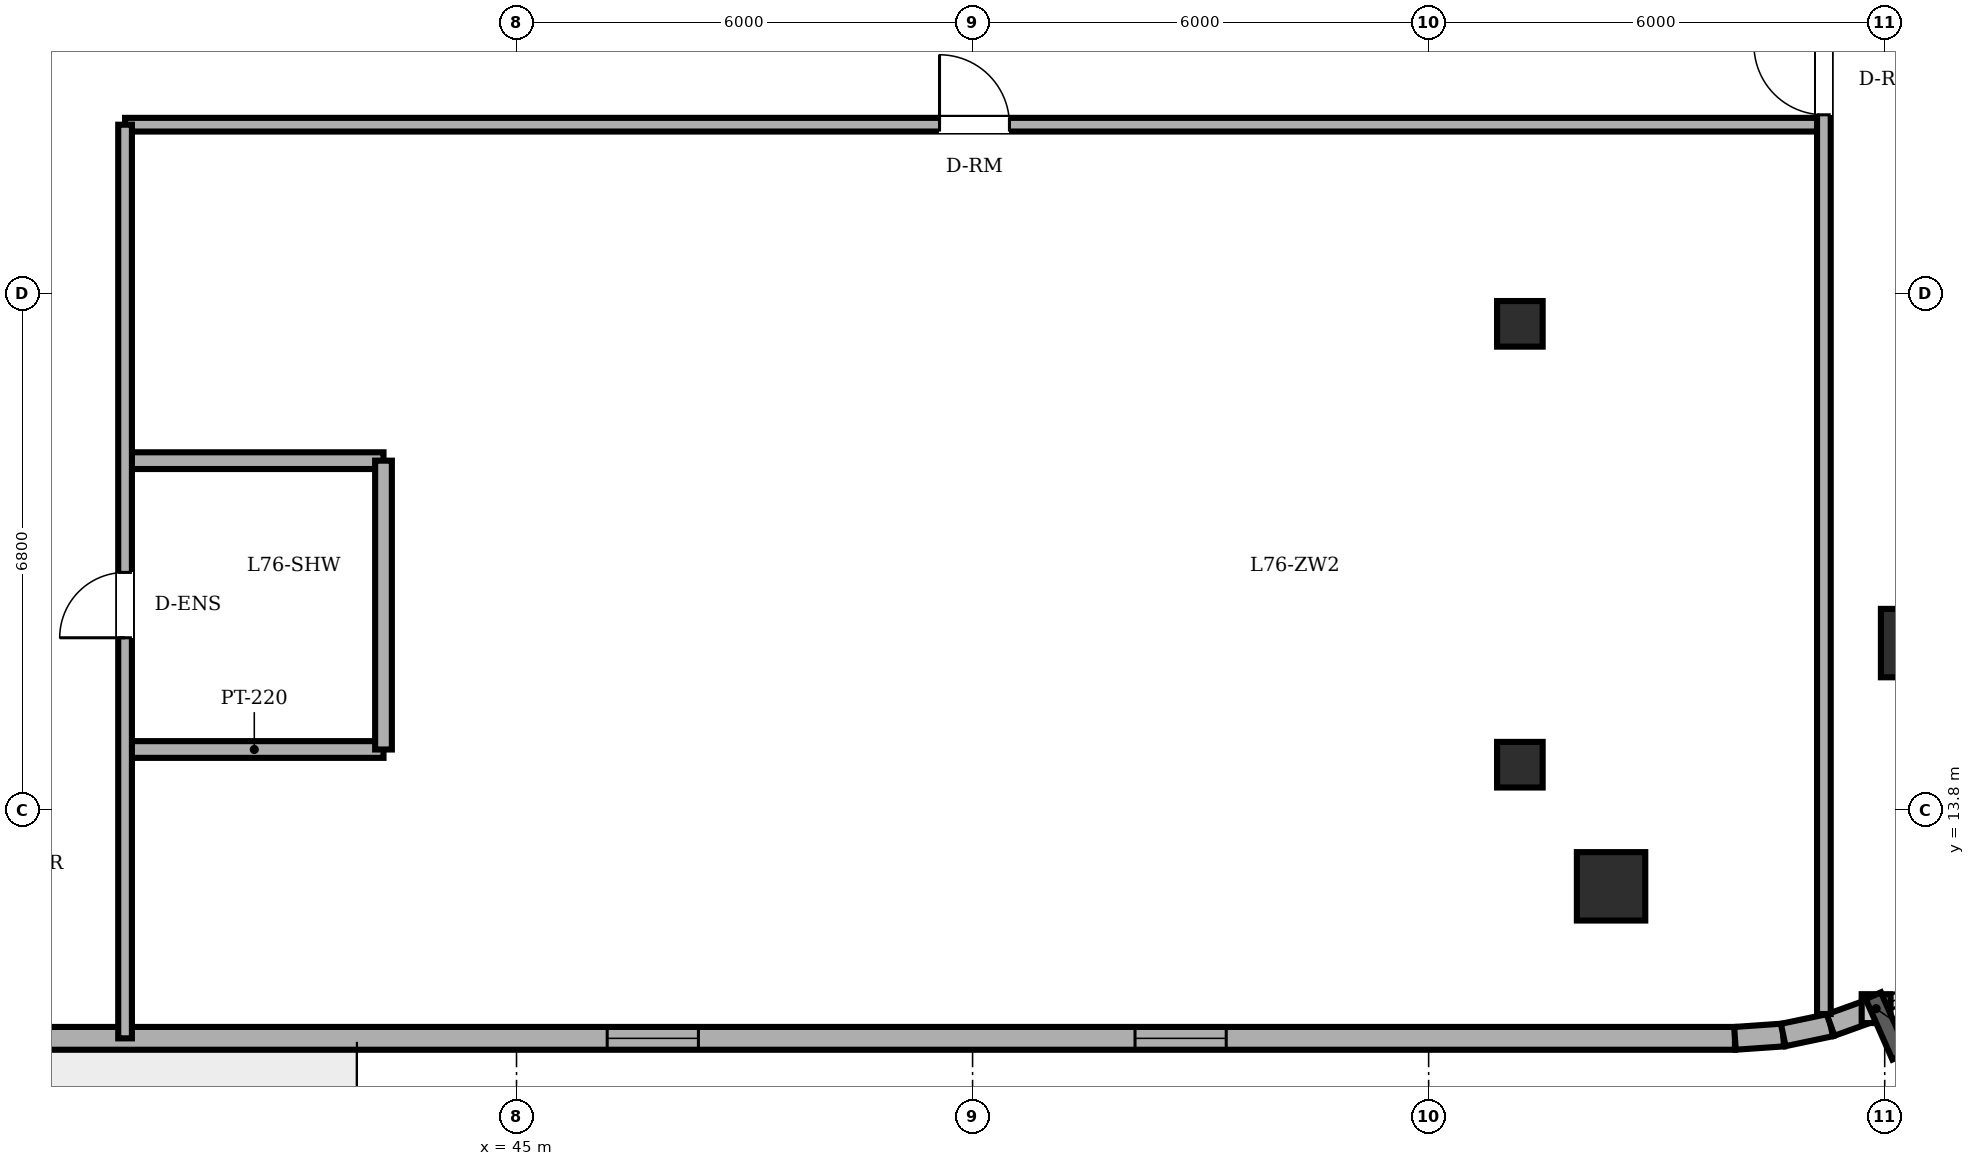
"""IFC4 building model, lengths in metres.
Left out: names, types, materials, properties, quantities, classifications, styles, units other than length and angle.
Written with IfcOpenShell. Run it as: python <this file> out.ifc"""

import sys

from ifc_helpers import new_model, si_unit, direction, frame, frame_2d, origin, origin_2d, place, context, subcontext, project, spatial, rectangle, circle, extrude, element, fill, save


model = new_model("IFC4")
c1 = context("Model", 3, precision=1e-05, world=origin(), true_north=direction((0.0, 1.0)))
c2 = subcontext(c1, "Body", "Model", "MODEL_VIEW")
j1 = project(units=[si_unit("LENGTHUNIT", "METRE"), si_unit("PLANEANGLEUNIT", "RADIAN")], contexts=[c1])
p1 = place(None, origin())
s1 = spatial("IfcSite", under=j1, at=p1, CompositionType="ELEMENT")
p2 = place(p1, origin())
s2 = spatial("IfcBuilding", under=s1, at=p2, CompositionType="ELEMENT")
p3 = place(p2, frame((0.0, 0.0, 291.65)))
s3 = spatial("IfcBuildingStorey", under=s2, at=p3, CompositionType="ELEMENT", Elevation=291.65)
for number, where, z_axis, x_axis in (
    (1, (59.4, 12.8, 0.0), (0.0, 0.0, 1.0), (1.0, 0.0, 0.0)),
    (2, (63.4, 16.0, 0.0), (0.0, 0.0, 1.0), (1.0, 0.0, 0.0)),
):
    element("IfcColumn", number, at=place(p3, frame(where, z_axis=z_axis, x_axis=x_axis)), inside=s3, PredefinedType="COLUMN", context=c2, shape_type="SweptSolid", body=[
        extrude(circle(Radius=0.45, at=origin_2d()), origin(), (0.0, 0.0, 1.0), 3.65),
    ])
for number, where, z_axis, x_axis in (
    (3, (58.2, 14.4, 0.0), (0.0, 0.0, 1.0), (1.0, 0.0, 0.0)),
    (4, (58.2, 20.2, 0.0), (0.0, 0.0, 1.0), (1.0, 0.0, 0.0)),
):
    element("IfcColumn", number, at=place(p3, frame(where, z_axis=z_axis, x_axis=x_axis)), inside=s3, PredefinedType="COLUMN", context=c2, shape_type="SweptSolid", body=[
        extrude(rectangle(XDim=0.6, YDim=0.6, at=origin_2d()), origin(), (0.0, 0.0, 1.0), 3.65),
    ])
p4 = place(p3, frame((24.0, 10.8, 0.0), z_axis=(0.0, 0.0, 1.0), x_axis=(1.0, 0.0, 0.0)))
e5 = element("IfcWall", 5, at=p4, inside=s3, PredefinedType="SOLIDWALL", context=c2, shape_type="SweptSolid", body=[
    extrude(rectangle(XDim=37.03, YDim=0.3, at=frame_2d((18.515, 0.0))), origin(), (0.0, 0.0, 1.0), 3.41),
])
p5 = place(p4, frame((7.925, 0.0, 0.0)))
e6 = element("IfcOpeningElement", 6, at=p5, cuts=e5, PredefinedType="OPENING", context=c2, shape_type="SweptSolid", body=[
    extrude(rectangle(XDim=0.95, YDim=2.2, at=frame_2d((0.475, 1.1))), frame((0.0, 0.16, 0.0), z_axis=(0.0, -1.0, 0.0), x_axis=(1.0, 0.0, 0.0)), (0.0, 0.0, 1.0), 0.32),
])
p6 = place(p4, frame((4.917, 0.0, 0.85)))
e7 = element("IfcOpeningElement", 7, at=p6, cuts=e5, PredefinedType="OPENING", context=c2, shape_type="SweptSolid", body=[
    extrude(rectangle(XDim=1.2, YDim=1.6, at=frame_2d((0.6, 0.8))), frame((0.0, 0.16, 0.0), z_axis=(0.0, -1.0, 0.0), x_axis=(1.0, 0.0, 0.0)), (0.0, 0.0, 1.0), 0.32),
])
p7 = place(p4, frame((10.083, 0.0, 0.85)))
e8 = element("IfcOpeningElement", 8, at=p7, cuts=e5, PredefinedType="OPENING", context=c2, shape_type="SweptSolid", body=[
    extrude(rectangle(XDim=1.2, YDim=1.6, at=frame_2d((0.6, 0.8))), frame((0.0, 0.16, 0.0), z_axis=(0.0, -1.0, 0.0), x_axis=(1.0, 0.0, 0.0)), (0.0, 0.0, 1.0), 0.32),
])
p8 = place(p4, frame((22.193, 0.0, 0.85)))
e9 = element("IfcOpeningElement", 9, at=p8, cuts=e5, PredefinedType="OPENING", context=c2, shape_type="SweptSolid", body=[
    extrude(rectangle(XDim=1.2, YDim=1.6, at=frame_2d((0.6, 0.8))), frame((0.0, 0.16, 0.0), z_axis=(0.0, -1.0, 0.0), x_axis=(1.0, 0.0, 0.0)), (0.0, 0.0, 1.0), 0.32),
])
p9 = place(p4, frame((29.137, 0.0, 0.85)))
e10 = element("IfcOpeningElement", 10, at=p9, cuts=e5, PredefinedType="OPENING", context=c2, shape_type="SweptSolid", body=[
    extrude(rectangle(XDim=1.2, YDim=1.6, at=frame_2d((0.6, 0.8))), frame((0.0, 0.16, 0.0), z_axis=(0.0, -1.0, 0.0), x_axis=(1.0, 0.0, 0.0)), (0.0, 0.0, 1.0), 0.32),
])
p10 = place(p3, frame((61.03, 10.8, 0.0), z_axis=(0.0, 0.0, 1.0), x_axis=(0.997613959688, 0.069039028352, 0.0)))
e11 = element("IfcWall", 11, at=p10, inside=s3, PredefinedType="SOLIDWALL", context=c2, shape_type="SweptSolid", body=[
    extrude(rectangle(XDim=0.636, YDim=0.3, at=frame_2d((0.318, 0.0))), origin(), (0.0, 0.0, 1.0), 3.41),
])
p11 = place(p3, frame((61.665, 10.844, 0.0), z_axis=(0.0, 0.0, 1.0), x_axis=(0.97857012251, 0.205913854149, 0.0)))
e12 = element("IfcWall", 12, at=p11, inside=s3, PredefinedType="SOLIDWALL", context=c2, shape_type="SweptSolid", body=[
    extrude(rectangle(XDim=0.637, YDim=0.3, at=frame_2d((0.318, 0.0))), origin(), (0.0, 0.0, 1.0), 3.41),
])
p12 = place(p3, frame((62.288, 10.975, 0.0), z_axis=(0.0, 0.0, 1.0), x_axis=(0.94077491148, 0.339031806665, 0.0)))
e13 = element("IfcWall", 13, at=p12, inside=s3, PredefinedType="SOLIDWALL", context=c2, shape_type="SweptSolid", body=[
    extrude(rectangle(XDim=0.636, YDim=0.3, at=frame_2d((0.318, 0.0))), origin(), (0.0, 0.0, 1.0), 3.41),
])
p13 = place(p3, frame((39.85, 14.6, 0.0), z_axis=(0.0, 0.0, 1.0), x_axis=(1.0, 0.0, 0.0)))
e14 = element("IfcWall", 14, at=p13, inside=s3, PredefinedType="PARTITIONING", context=c2, shape_type="SweptSolid", body=[
    extrude(rectangle(XDim=3.4, YDim=0.22, at=frame_2d((1.7, 0.0))), origin(), (0.0, 0.0, 1.0), 3.052),
])
p14 = place(p3, frame((39.85, 18.4, 0.0), z_axis=(0.0, 0.0, 1.0), x_axis=(1.0, 0.0, 0.0)))
e15 = element("IfcWall", 15, at=p14, inside=s3, PredefinedType="PARTITIONING", context=c2, shape_type="SweptSolid", body=[
    extrude(rectangle(XDim=3.4, YDim=0.22, at=frame_2d((1.7, 0.0))), origin(), (0.0, 0.0, 1.0), 3.41),
])
p15 = place(p3, frame((39.85, 22.82, 0.0), z_axis=(0.0, 0.0, 1.0), x_axis=(1.0, 0.0, 0.0)))
e16 = element("IfcWall", 16, at=p15, inside=s3, PredefinedType="PARTITIONING", context=c2, shape_type="SweptSolid", body=[
    extrude(rectangle(XDim=22.35, YDim=0.18, at=frame_2d((11.175, 0.0))), origin(), (0.0, 0.0, 1.0), 3.41),
])
p16 = place(p15, frame((10.715, 0.0, 0.0)))
e17 = element("IfcOpeningElement", 17, at=p16, cuts=e16, PredefinedType="OPENING", context=c2, shape_type="SweptSolid", body=[
    extrude(rectangle(XDim=0.92, YDim=2.1, at=frame_2d((0.46, 1.05))), frame((0.0, 0.1, 0.0), z_axis=(0.0, -1.0, 0.0), x_axis=(1.0, 0.0, 0.0)), (0.0, 0.0, 1.0), 0.2),
])
p17 = place(p3, frame((39.85, 10.8, 0.0), z_axis=(0.0, 0.0, 1.0), x_axis=(0.0, 1.0, 0.0)))
e18 = element("IfcWall", 18, at=p17, inside=s3, PredefinedType="PARTITIONING", context=c2, shape_type="SweptSolid", body=[
    extrude(rectangle(XDim=12.02, YDim=0.18, at=frame_2d((6.01, 0.0))), origin(), (0.0, 0.0, 1.0), 3.41),
])
p18 = place(p17, frame((5.27, 0.0, 0.0)))
e19 = element("IfcOpeningElement", 19, at=p18, cuts=e18, PredefinedType="OPENING", context=c2, shape_type="SweptSolid", body=[
    extrude(rectangle(XDim=0.86, YDim=2.1, at=frame_2d((0.43, 1.05))), frame((0.0, 0.1, 0.0), z_axis=(0.0, -1.0, 0.0), x_axis=(1.0, 0.0, 0.0)), (0.0, 0.0, 1.0), 0.2),
])
p19 = place(p3, frame((43.25, 14.6, 0.0), z_axis=(0.0, 0.0, 1.0), x_axis=(0.0, 1.0, 0.0)))
e20 = element("IfcWall", 20, at=p19, inside=s3, PredefinedType="PARTITIONING", context=c2, shape_type="SweptSolid", body=[
    extrude(rectangle(XDim=3.8, YDim=0.22, at=frame_2d((1.9, 0.0))), origin(), (0.0, 0.0, 1.0), 3.41),
])
p20 = place(p3, frame((62.2, 11.12, 0.0), z_axis=(0.0, 0.0, 1.0), x_axis=(0.0, 1.0, 0.0)))
e21 = element("IfcWall", 21, at=p20, inside=s3, PredefinedType="PARTITIONING", context=c2, shape_type="SweptSolid", body=[
    extrude(rectangle(XDim=19.23, YDim=0.18, at=frame_2d((9.615, 0.0))), origin(), (0.0, 0.0, 1.0), 3.41),
])
p21 = place(p20, frame((15.295, 0.0, 0.0)))
e22 = element("IfcOpeningElement", 22, at=p21, cuts=e21, PredefinedType="OPENING", context=c2, shape_type="SweptSolid", body=[
    extrude(rectangle(XDim=1.0, YDim=2.15, at=frame_2d((0.5, 1.075))), frame((0.0, 0.1, 0.0), z_axis=(0.0, -1.0, 0.0), x_axis=(1.0, 0.0, 0.0)), (0.0, 0.0, 1.0), 0.2),
])
p22 = place(p20, frame((11.83, 0.0, 0.0)))
e23 = element("IfcOpeningElement", 23, at=p22, cuts=e21, PredefinedType="OPENING", context=c2, shape_type="SweptSolid", body=[
    extrude(rectangle(XDim=0.92, YDim=2.1, at=frame_2d((0.46, 1.05))), frame((0.0, 0.1, 0.0), z_axis=(0.0, -1.0, 0.0), x_axis=(1.0, 0.0, 0.0)), (0.0, 0.0, 1.0), 0.2),
])
p23 = place(p8, origin())
e24 = element("IfcWindow", 24, at=p23, inside=s3, PartitioningType="SINGLE_PANEL", PredefinedType="WINDOW", context=c2, shape_type="SweptSolid", body=[
    extrude(rectangle(XDim=1.2, YDim=1.6, at=frame_2d((0.6, 0.8))), frame((0.0, 0.03, 0.0), z_axis=(0.0, -1.0, 0.0), x_axis=(1.0, 0.0, 0.0)), (0.0, 0.0, 1.0), 0.06),
])
fill(e9, e24)
p24 = place(p9, origin())
e25 = element("IfcWindow", 25, at=p24, inside=s3, PartitioningType="SINGLE_PANEL", PredefinedType="WINDOW", context=c2, shape_type="SweptSolid", body=[
    extrude(rectangle(XDim=1.2, YDim=1.6, at=frame_2d((0.6, 0.8))), frame((0.0, 0.03, 0.0), z_axis=(0.0, -1.0, 0.0), x_axis=(1.0, 0.0, 0.0)), (0.0, 0.0, 1.0), 0.06),
])
fill(e10, e25)
p25 = place(p18, origin())
e26 = element("IfcDoor", 26, at=p25, inside=s3, OperationType="SINGLE_SWING_LEFT", PredefinedType="DOOR", context=c2, shape_type="SweptSolid", body=[
    extrude(rectangle(XDim=0.86, YDim=2.1, at=frame_2d((0.43, 1.05))), frame((0.0, 0.025, 0.0), z_axis=(0.0, -1.0, 0.0), x_axis=(1.0, 0.0, 0.0)), (0.0, 0.0, 1.0), 0.05),
])
fill(e19, e26)
p26 = place(p16, origin())
e27 = element("IfcDoor", 27, at=p26, inside=s3, OperationType="SINGLE_SWING_LEFT", PredefinedType="DOOR", context=c2, shape_type="SweptSolid", body=[
    extrude(rectangle(XDim=0.92, YDim=2.1, at=frame_2d((0.46, 1.05))), frame((0.0, 0.025, 0.0), z_axis=(0.0, -1.0, 0.0), x_axis=(1.0, 0.0, 0.0)), (0.0, 0.0, 1.0), 0.05),
])
fill(e17, e27)
p27 = place(p22, origin())
e28 = element("IfcDoor", 28, at=p27, inside=s3, OperationType="SINGLE_SWING_RIGHT", PredefinedType="DOOR", context=c2, shape_type="SweptSolid", body=[
    extrude(rectangle(XDim=0.92, YDim=2.1, at=frame_2d((0.46, 1.05))), frame((0.0, 0.025, 0.0), z_axis=(0.0, -1.0, 0.0), x_axis=(1.0, 0.0, 0.0)), (0.0, 0.0, 1.0), 0.05),
])
fill(e23, e28)
save(model, sys.argv[1])
